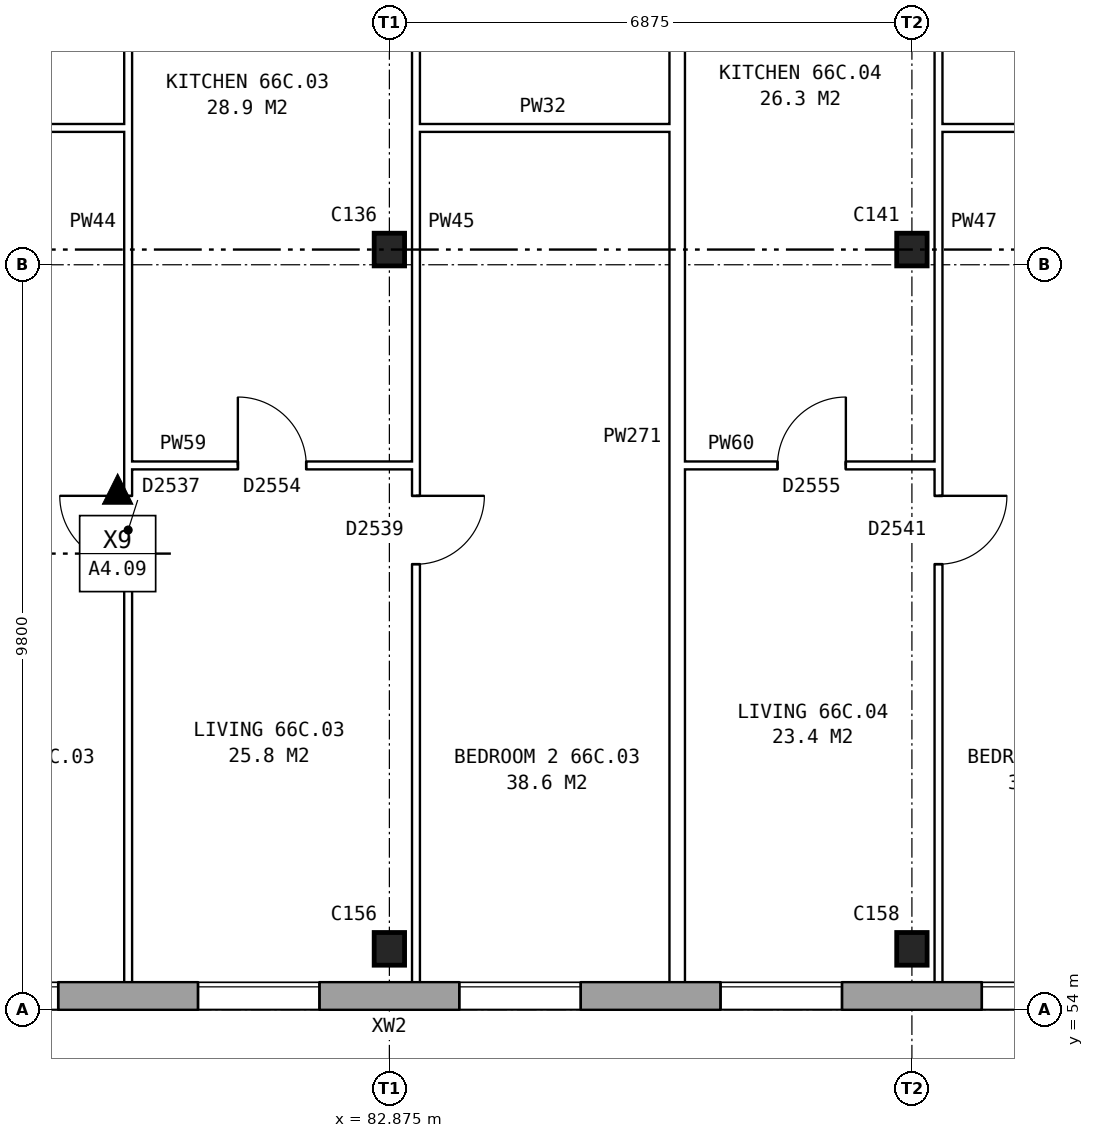
"""IFC4 building model, lengths in metres.
Left out: names, types, materials, properties, quantities, classifications, styles, units other than length and angle.
Written with IfcOpenShell. Run it as: python <this file> out.ifc"""

import sys

from ifc_helpers import new_model, si_unit, direction, frame, frame_2d, origin, origin_2d, place, context, subcontext, project, spatial, rectangle, i_section, extrude, element, fill, save


model = new_model("IFC4")
c1 = context("Model", 3, precision=1e-05, world=origin(), true_north=direction((0.0, 1.0)))
c2 = subcontext(c1, "Body", "Model", "MODEL_VIEW")
j1 = project(units=[si_unit("LENGTHUNIT", "METRE"), si_unit("PLANEANGLEUNIT", "RADIAN")], contexts=[c1])
p1 = place(None, origin())
s1 = spatial("IfcSite", under=j1, at=p1, CompositionType="ELEMENT")
p2 = place(p1, origin())
s2 = spatial("IfcBuilding", under=s1, at=p2, CompositionType="ELEMENT")
p3 = place(p2, frame((0.0, 0.0, 233.8)))
s3 = spatial("IfcBuildingStorey", under=s2, at=p3, CompositionType="ELEMENT", Elevation=233.8)
for number, where, z_axis, x_axis in (
    (1, (82.875, 54.8, 0.0), (0.0, 0.0, 1.0), (1.0, 0.0, 0.0)),
    (2, (89.75, 54.8, 0.0), (0.0, 0.0, 1.0), (1.0, 0.0, 0.0)),
    (3, (82.875, 64.0, 0.0), (0.0, 0.0, 1.0), (1.0, 0.0, 0.0)),
    (4, (89.75, 64.0, 0.0), (0.0, 0.0, 1.0), (1.0, 0.0, 0.0)),
):
    element("IfcColumn", number, at=place(p3, frame(where, z_axis=z_axis, x_axis=x_axis)), inside=s3, PredefinedType="COLUMN", context=c2, shape_type="SweptSolid", body=[
        extrude(i_section(OverallWidth=0.4, OverallDepth=0.43, WebThickness=0.028, FlangeThickness=0.04, at=origin_2d()), origin(), (0.0, 0.0, 1.0), 2.85),
    ])
p4 = place(p3, frame((75.95, 54.18, 0.0), z_axis=(0.0, 0.0, 1.0), x_axis=(1.0, 0.0, 0.0)))
e5 = element("IfcWall", 5, at=p4, inside=s3, PredefinedType="STANDARD", context=c2, shape_type="SweptSolid", body=[
    extrude(rectangle(XDim=55.1, YDim=0.36, at=frame_2d((27.55, 0.0))), origin(), (0.0, 0.0, 1.0), 2.85),
])
p5 = place(p4, frame((0.969, 0.0, 0.8)))
e6 = element("IfcOpeningElement", 6, at=p5, cuts=e5, PredefinedType="OPENING", context=c2, shape_type="SweptSolid", body=[
    extrude(rectangle(XDim=1.6, YDim=1.8, at=frame_2d((0.8, 0.9))), frame((0.0, 0.19, 0.0), z_axis=(0.0, -1.0, 0.0), x_axis=(1.0, 0.0, 0.0)), (0.0, 0.0, 1.0), 0.38),
])
p6 = place(p4, frame((4.406, 0.0, 0.8)))
e7 = element("IfcOpeningElement", 7, at=p6, cuts=e5, PredefinedType="OPENING", context=c2, shape_type="SweptSolid", body=[
    extrude(rectangle(XDim=1.6, YDim=1.8, at=frame_2d((0.8, 0.9))), frame((0.0, 0.19, 0.0), z_axis=(0.0, -1.0, 0.0), x_axis=(1.0, 0.0, 0.0)), (0.0, 0.0, 1.0), 0.38),
])
p7 = place(p4, frame((7.844, 0.0, 0.8)))
e8 = element("IfcOpeningElement", 8, at=p7, cuts=e5, PredefinedType="OPENING", context=c2, shape_type="SweptSolid", body=[
    extrude(rectangle(XDim=1.6, YDim=1.8, at=frame_2d((0.8, 0.9))), frame((0.0, 0.19, 0.0), z_axis=(0.0, -1.0, 0.0), x_axis=(1.0, 0.0, 0.0)), (0.0, 0.0, 1.0), 0.38),
])
p8 = place(p4, frame((11.281, 0.0, 0.8)))
e9 = element("IfcOpeningElement", 9, at=p8, cuts=e5, PredefinedType="OPENING", context=c2, shape_type="SweptSolid", body=[
    extrude(rectangle(XDim=1.6, YDim=1.8, at=frame_2d((0.8, 0.9))), frame((0.0, 0.19, 0.0), z_axis=(0.0, -1.0, 0.0), x_axis=(1.0, 0.0, 0.0)), (0.0, 0.0, 1.0), 0.38),
])
p9 = place(p4, frame((14.719, 0.0, 0.8)))
e10 = element("IfcOpeningElement", 10, at=p9, cuts=e5, PredefinedType="OPENING", context=c2, shape_type="SweptSolid", body=[
    extrude(rectangle(XDim=1.6, YDim=1.8, at=frame_2d((0.8, 0.9))), frame((0.0, 0.19, 0.0), z_axis=(0.0, -1.0, 0.0), x_axis=(1.0, 0.0, 0.0)), (0.0, 0.0, 1.0), 0.38),
])
p10 = place(p4, frame((18.156, 0.0, 0.8)))
e11 = element("IfcOpeningElement", 11, at=p10, cuts=e5, PredefinedType="OPENING", context=c2, shape_type="SweptSolid", body=[
    extrude(rectangle(XDim=1.6, YDim=1.8, at=frame_2d((0.8, 0.9))), frame((0.0, 0.19, 0.0), z_axis=(0.0, -1.0, 0.0), x_axis=(1.0, 0.0, 0.0)), (0.0, 0.0, 1.0), 0.38),
])
p11 = place(p4, frame((21.594, 0.0, 0.8)))
e12 = element("IfcOpeningElement", 12, at=p11, cuts=e5, PredefinedType="OPENING", context=c2, shape_type="SweptSolid", body=[
    extrude(rectangle(XDim=1.6, YDim=1.8, at=frame_2d((0.8, 0.9))), frame((0.0, 0.19, 0.0), z_axis=(0.0, -1.0, 0.0), x_axis=(1.0, 0.0, 0.0)), (0.0, 0.0, 1.0), 0.38),
])
p12 = place(p4, frame((25.031, 0.0, 0.8)))
e13 = element("IfcOpeningElement", 13, at=p12, cuts=e5, PredefinedType="OPENING", context=c2, shape_type="SweptSolid", body=[
    extrude(rectangle(XDim=1.6, YDim=1.8, at=frame_2d((0.8, 0.9))), frame((0.0, 0.19, 0.0), z_axis=(0.0, -1.0, 0.0), x_axis=(1.0, 0.0, 0.0)), (0.0, 0.0, 1.0), 0.38),
])
p13 = place(p4, frame((28.469, 0.0, 0.8)))
e14 = element("IfcOpeningElement", 14, at=p13, cuts=e5, PredefinedType="OPENING", context=c2, shape_type="SweptSolid", body=[
    extrude(rectangle(XDim=1.6, YDim=1.8, at=frame_2d((0.8, 0.9))), frame((0.0, 0.19, 0.0), z_axis=(0.0, -1.0, 0.0), x_axis=(1.0, 0.0, 0.0)), (0.0, 0.0, 1.0), 0.38),
])
p14 = place(p4, frame((31.906, 0.0, 0.8)))
e15 = element("IfcOpeningElement", 15, at=p14, cuts=e5, PredefinedType="OPENING", context=c2, shape_type="SweptSolid", body=[
    extrude(rectangle(XDim=1.6, YDim=1.8, at=frame_2d((0.8, 0.9))), frame((0.0, 0.19, 0.0), z_axis=(0.0, -1.0, 0.0), x_axis=(1.0, 0.0, 0.0)), (0.0, 0.0, 1.0), 0.38),
])
p15 = place(p4, frame((35.344, 0.0, 0.8)))
e16 = element("IfcOpeningElement", 16, at=p15, cuts=e5, PredefinedType="OPENING", context=c2, shape_type="SweptSolid", body=[
    extrude(rectangle(XDim=1.6, YDim=1.8, at=frame_2d((0.8, 0.9))), frame((0.0, 0.19, 0.0), z_axis=(0.0, -1.0, 0.0), x_axis=(1.0, 0.0, 0.0)), (0.0, 0.0, 1.0), 0.38),
])
p16 = place(p4, frame((38.781, 0.0, 0.8)))
e17 = element("IfcOpeningElement", 17, at=p16, cuts=e5, PredefinedType="OPENING", context=c2, shape_type="SweptSolid", body=[
    extrude(rectangle(XDim=1.6, YDim=1.8, at=frame_2d((0.8, 0.9))), frame((0.0, 0.19, 0.0), z_axis=(0.0, -1.0, 0.0), x_axis=(1.0, 0.0, 0.0)), (0.0, 0.0, 1.0), 0.38),
])
p17 = place(p4, frame((42.219, 0.0, 0.8)))
e18 = element("IfcOpeningElement", 18, at=p17, cuts=e5, PredefinedType="OPENING", context=c2, shape_type="SweptSolid", body=[
    extrude(rectangle(XDim=1.6, YDim=1.8, at=frame_2d((0.8, 0.9))), frame((0.0, 0.19, 0.0), z_axis=(0.0, -1.0, 0.0), x_axis=(1.0, 0.0, 0.0)), (0.0, 0.0, 1.0), 0.38),
])
p18 = place(p4, frame((45.656, 0.0, 0.8)))
e19 = element("IfcOpeningElement", 19, at=p18, cuts=e5, PredefinedType="OPENING", context=c2, shape_type="SweptSolid", body=[
    extrude(rectangle(XDim=1.6, YDim=1.8, at=frame_2d((0.8, 0.9))), frame((0.0, 0.19, 0.0), z_axis=(0.0, -1.0, 0.0), x_axis=(1.0, 0.0, 0.0)), (0.0, 0.0, 1.0), 0.38),
])
p19 = place(p4, frame((49.094, 0.0, 0.8)))
e20 = element("IfcOpeningElement", 20, at=p19, cuts=e5, PredefinedType="OPENING", context=c2, shape_type="SweptSolid", body=[
    extrude(rectangle(XDim=1.6, YDim=1.8, at=frame_2d((0.8, 0.9))), frame((0.0, 0.19, 0.0), z_axis=(0.0, -1.0, 0.0), x_axis=(1.0, 0.0, 0.0)), (0.0, 0.0, 1.0), 0.38),
])
p20 = place(p4, frame((52.531, 0.0, 0.8)))
e21 = element("IfcOpeningElement", 21, at=p20, cuts=e5, PredefinedType="OPENING", context=c2, shape_type="SweptSolid", body=[
    extrude(rectangle(XDim=1.6, YDim=1.8, at=frame_2d((0.8, 0.9))), frame((0.0, 0.19, 0.0), z_axis=(0.0, -1.0, 0.0), x_axis=(1.0, 0.0, 0.0)), (0.0, 0.0, 1.0), 0.38),
])
p21 = place(p3, frame((79.438, 61.16, 0.0), z_axis=(0.0, 0.0, 1.0), x_axis=(1.0, 0.0, 0.0)))
e22 = element("IfcWall", 22, at=p21, inside=s3, PredefinedType="PARTITIONING", context=c2, shape_type="SweptSolid", body=[
    extrude(rectangle(XDim=3.787, YDim=0.1, at=frame_2d((1.894, 0.0))), origin(), (0.0, 0.0, 1.0), 2.85),
])
p22 = place(p21, frame((1.444, 0.0, 0.0)))
e23 = element("IfcOpeningElement", 23, at=p22, cuts=e22, PredefinedType="OPENING", context=c2, shape_type="SweptSolid", body=[
    extrude(rectangle(XDim=0.9, YDim=2.1, at=frame_2d((0.45, 1.05))), frame((0.0, 0.06, 0.0), z_axis=(0.0, -1.0, 0.0), x_axis=(1.0, 0.0, 0.0)), (0.0, 0.0, 1.0), 0.12),
])
p23 = place(p3, frame((86.762, 61.16, 0.0), z_axis=(0.0, 0.0, 1.0), x_axis=(1.0, 0.0, 0.0)))
e24 = element("IfcWall", 24, at=p23, inside=s3, PredefinedType="PARTITIONING", context=c2, shape_type="SweptSolid", body=[
    extrude(rectangle(XDim=3.338, YDim=0.1, at=frame_2d((1.669, 0.0))), origin(), (0.0, 0.0, 1.0), 2.85),
])
p24 = place(p23, frame((1.219, 0.0, 0.0)))
e25 = element("IfcOpeningElement", 25, at=p24, cuts=e24, PredefinedType="OPENING", context=c2, shape_type="SweptSolid", body=[
    extrude(rectangle(XDim=0.9, YDim=2.1, at=frame_2d((0.45, 1.05))), frame((0.0, 0.06, 0.0), z_axis=(0.0, -1.0, 0.0), x_axis=(1.0, 0.0, 0.0)), (0.0, 0.0, 1.0), 0.12),
])
p25 = place(p3, frame((75.64, 65.6, 0.0), z_axis=(0.0, 0.0, 1.0), x_axis=(1.0, 0.0, 0.0)))
e26 = element("IfcWall", 26, at=p25, inside=s3, PredefinedType="PARTITIONING", context=c2, shape_type="SweptSolid", body=[
    extrude(rectangle(XDim=3.798, YDim=0.1, at=frame_2d((1.899, 0.0))), origin(), (0.0, 0.0, 1.0), 2.85),
])
for number, where, z_axis, x_axis in (
    (27, (83.225, 65.6, 0.0), (0.0, 0.0, 1.0), (1.0, 0.0, 0.0)),
    (28, (90.1, 65.6, 0.0), (0.0, 0.0, 1.0), (1.0, 0.0, 0.0)),
):
    element("IfcWall", number, at=place(p3, frame(where, z_axis=z_axis, x_axis=x_axis)), inside=s3, PredefinedType="PARTITIONING", context=c2, shape_type="SweptSolid", body=[
        extrude(rectangle(XDim=3.337, YDim=0.1, at=frame_2d((1.668, 0.0))), origin(), (0.0, 0.0, 1.0), 2.85),
    ])
p26 = place(p3, frame((79.438, 54.36, 0.0), z_axis=(0.0, 0.0, 1.0), x_axis=(0.0, 1.0, 0.0)))
e29 = element("IfcWall", 29, at=p26, inside=s3, PredefinedType="PARTITIONING", context=c2, shape_type="SweptSolid", body=[
    extrude(rectangle(XDim=14.34, YDim=0.1, at=frame_2d((7.17, 0.0))), origin(), (0.0, 0.0, 1.0), 2.85),
])
p27 = place(p26, frame((5.5, 0.0, 0.0)))
e30 = element("IfcOpeningElement", 30, at=p27, cuts=e29, PredefinedType="OPENING", context=c2, shape_type="SweptSolid", body=[
    extrude(rectangle(XDim=0.9, YDim=2.1, at=frame_2d((0.45, 1.05))), frame((0.0, 0.06, 0.0), z_axis=(0.0, -1.0, 0.0), x_axis=(1.0, 0.0, 0.0)), (0.0, 0.0, 1.0), 0.12),
])
p28 = place(p26, frame((13.04, 0.0, 0.0)))
e31 = element("IfcOpeningElement", 31, at=p28, cuts=e29, PredefinedType="OPENING", context=c2, shape_type="SweptSolid", body=[
    extrude(rectangle(XDim=0.9, YDim=2.1, at=frame_2d((0.45, 1.05))), frame((0.0, 0.06, 0.0), z_axis=(0.0, -1.0, 0.0), x_axis=(1.0, 0.0, 0.0)), (0.0, 0.0, 1.0), 0.12),
])
p29 = place(p3, frame((83.225, 54.36, 0.0), z_axis=(0.0, 0.0, 1.0), x_axis=(0.0, 1.0, 0.0)))
e32 = element("IfcWall", 32, at=p29, inside=s3, PredefinedType="PARTITIONING", context=c2, shape_type="SweptSolid", body=[
    extrude(rectangle(XDim=14.34, YDim=0.1, at=frame_2d((7.17, 0.0))), origin(), (0.0, 0.0, 1.0), 2.85),
])
p30 = place(p29, frame((5.5, 0.0, 0.0)))
e33 = element("IfcOpeningElement", 33, at=p30, cuts=e32, PredefinedType="OPENING", context=c2, shape_type="SweptSolid", body=[
    extrude(rectangle(XDim=0.9, YDim=2.1, at=frame_2d((0.45, 1.05))), frame((0.0, 0.06, 0.0), z_axis=(0.0, -1.0, 0.0), x_axis=(1.0, 0.0, 0.0)), (0.0, 0.0, 1.0), 0.12),
])
p31 = place(p29, frame((13.04, 0.0, 0.0)))
e34 = element("IfcOpeningElement", 34, at=p31, cuts=e32, PredefinedType="OPENING", context=c2, shape_type="SweptSolid", body=[
    extrude(rectangle(XDim=0.9, YDim=2.1, at=frame_2d((0.45, 1.05))), frame((0.0, 0.06, 0.0), z_axis=(0.0, -1.0, 0.0), x_axis=(1.0, 0.0, 0.0)), (0.0, 0.0, 1.0), 0.12),
])
p32 = place(p3, frame((86.662, 54.36, 0.0), z_axis=(0.0, 0.0, 1.0), x_axis=(0.0, 1.0, 0.0)))
e35 = element("IfcWall", 35, at=p32, inside=s3, PredefinedType="PARTITIONING", context=c2, shape_type="SweptSolid", body=[
    extrude(rectangle(XDim=14.34, YDim=0.2, at=frame_2d((7.17, 0.0))), origin(), (0.0, 0.0, 1.0), 2.85),
])
p33 = place(p3, frame((90.1, 54.36, 0.0), z_axis=(0.0, 0.0, 1.0), x_axis=(0.0, 1.0, 0.0)))
e36 = element("IfcWall", 36, at=p33, inside=s3, PredefinedType="PARTITIONING", context=c2, shape_type="SweptSolid", body=[
    extrude(rectangle(XDim=14.34, YDim=0.1, at=frame_2d((7.17, 0.0))), origin(), (0.0, 0.0, 1.0), 2.85),
])
p34 = place(p33, frame((5.5, 0.0, 0.0)))
e37 = element("IfcOpeningElement", 37, at=p34, cuts=e36, PredefinedType="OPENING", context=c2, shape_type="SweptSolid", body=[
    extrude(rectangle(XDim=0.9, YDim=2.1, at=frame_2d((0.45, 1.05))), frame((0.0, 0.06, 0.0), z_axis=(0.0, -1.0, 0.0), x_axis=(1.0, 0.0, 0.0)), (0.0, 0.0, 1.0), 0.12),
])
p35 = place(p33, frame((13.04, 0.0, 0.0)))
e38 = element("IfcOpeningElement", 38, at=p35, cuts=e36, PredefinedType="OPENING", context=c2, shape_type="SweptSolid", body=[
    extrude(rectangle(XDim=0.9, YDim=2.1, at=frame_2d((0.45, 1.05))), frame((0.0, 0.06, 0.0), z_axis=(0.0, -1.0, 0.0), x_axis=(1.0, 0.0, 0.0)), (0.0, 0.0, 1.0), 0.12),
])
p36 = place(p5, origin())
e39 = element("IfcWindow", 39, at=p36, inside=s3, PartitioningType="SINGLE_PANEL", PredefinedType="WINDOW", context=c2, shape_type="SweptSolid", body=[
    extrude(rectangle(XDim=1.6, YDim=1.8, at=frame_2d((0.8, 0.9))), frame((0.0, 0.15, 0.0), z_axis=(0.0, -1.0, 0.0), x_axis=(1.0, 0.0, 0.0)), (0.0, 0.0, 1.0), 0.06),
])
fill(e6, e39)
p37 = place(p6, origin())
e40 = element("IfcWindow", 40, at=p37, inside=s3, PartitioningType="SINGLE_PANEL", PredefinedType="WINDOW", context=c2, shape_type="SweptSolid", body=[
    extrude(rectangle(XDim=1.6, YDim=1.8, at=frame_2d((0.8, 0.9))), frame((0.0, 0.15, 0.0), z_axis=(0.0, -1.0, 0.0), x_axis=(1.0, 0.0, 0.0)), (0.0, 0.0, 1.0), 0.06),
])
fill(e7, e40)
p38 = place(p7, origin())
e41 = element("IfcWindow", 41, at=p38, inside=s3, PartitioningType="SINGLE_PANEL", PredefinedType="WINDOW", context=c2, shape_type="SweptSolid", body=[
    extrude(rectangle(XDim=1.6, YDim=1.8, at=frame_2d((0.8, 0.9))), frame((0.0, 0.15, 0.0), z_axis=(0.0, -1.0, 0.0), x_axis=(1.0, 0.0, 0.0)), (0.0, 0.0, 1.0), 0.06),
])
fill(e8, e41)
p39 = place(p8, origin())
e42 = element("IfcWindow", 42, at=p39, inside=s3, PartitioningType="SINGLE_PANEL", PredefinedType="WINDOW", context=c2, shape_type="SweptSolid", body=[
    extrude(rectangle(XDim=1.6, YDim=1.8, at=frame_2d((0.8, 0.9))), frame((0.0, 0.15, 0.0), z_axis=(0.0, -1.0, 0.0), x_axis=(1.0, 0.0, 0.0)), (0.0, 0.0, 1.0), 0.06),
])
fill(e9, e42)
p40 = place(p9, origin())
e43 = element("IfcWindow", 43, at=p40, inside=s3, PartitioningType="SINGLE_PANEL", PredefinedType="WINDOW", context=c2, shape_type="SweptSolid", body=[
    extrude(rectangle(XDim=1.6, YDim=1.8, at=frame_2d((0.8, 0.9))), frame((0.0, 0.15, 0.0), z_axis=(0.0, -1.0, 0.0), x_axis=(1.0, 0.0, 0.0)), (0.0, 0.0, 1.0), 0.06),
])
fill(e10, e43)
p41 = place(p27, origin())
e44 = element("IfcDoor", 44, at=p41, inside=s3, OperationType="SINGLE_SWING_RIGHT", PredefinedType="DOOR", context=c2, shape_type="SweptSolid", body=[
    extrude(rectangle(XDim=0.9, YDim=2.1, at=frame_2d((0.45, 1.05))), frame((0.0, 0.025, 0.0), z_axis=(0.0, -1.0, 0.0), x_axis=(1.0, 0.0, 0.0)), (0.0, 0.0, 1.0), 0.05),
])
fill(e30, e44)
p42 = place(p30, frame((0.9, 0.0, 0.0), z_axis=(0.0, 0.0, 1.0), x_axis=(-1.0, 0.0, 0.0)))
e45 = element("IfcDoor", 45, at=p42, inside=s3, OperationType="SINGLE_SWING_LEFT", PredefinedType="DOOR", context=c2, shape_type="SweptSolid", body=[
    extrude(rectangle(XDim=0.9, YDim=2.1, at=frame_2d((0.45, 1.05))), frame((0.0, 0.025, 0.0), z_axis=(0.0, -1.0, 0.0), x_axis=(1.0, 0.0, 0.0)), (0.0, 0.0, 1.0), 0.05),
])
fill(e33, e45)
p43 = place(p22, origin())
e46 = element("IfcDoor", 46, at=p43, inside=s3, OperationType="SINGLE_SWING_LEFT", PredefinedType="DOOR", context=c2, shape_type="SweptSolid", body=[
    extrude(rectangle(XDim=0.9, YDim=2.1, at=frame_2d((0.45, 1.05))), frame((0.0, 0.025, 0.0), z_axis=(0.0, -1.0, 0.0), x_axis=(1.0, 0.0, 0.0)), (0.0, 0.0, 1.0), 0.05),
])
fill(e23, e46)
p44 = place(p34, frame((0.9, 0.0, 0.0), z_axis=(0.0, 0.0, 1.0), x_axis=(-1.0, 0.0, 0.0)))
e47 = element("IfcDoor", 47, at=p44, inside=s3, OperationType="SINGLE_SWING_LEFT", PredefinedType="DOOR", context=c2, shape_type="SweptSolid", body=[
    extrude(rectangle(XDim=0.9, YDim=2.1, at=frame_2d((0.45, 1.05))), frame((0.0, 0.025, 0.0), z_axis=(0.0, -1.0, 0.0), x_axis=(1.0, 0.0, 0.0)), (0.0, 0.0, 1.0), 0.05),
])
fill(e37, e47)
p45 = place(p24, origin())
e48 = element("IfcDoor", 48, at=p45, inside=s3, OperationType="SINGLE_SWING_RIGHT", PredefinedType="DOOR", context=c2, shape_type="SweptSolid", body=[
    extrude(rectangle(XDim=0.9, YDim=2.1, at=frame_2d((0.45, 1.05))), frame((0.0, 0.025, 0.0), z_axis=(0.0, -1.0, 0.0), x_axis=(1.0, 0.0, 0.0)), (0.0, 0.0, 1.0), 0.05),
])
fill(e25, e48)
save(model, sys.argv[1])
